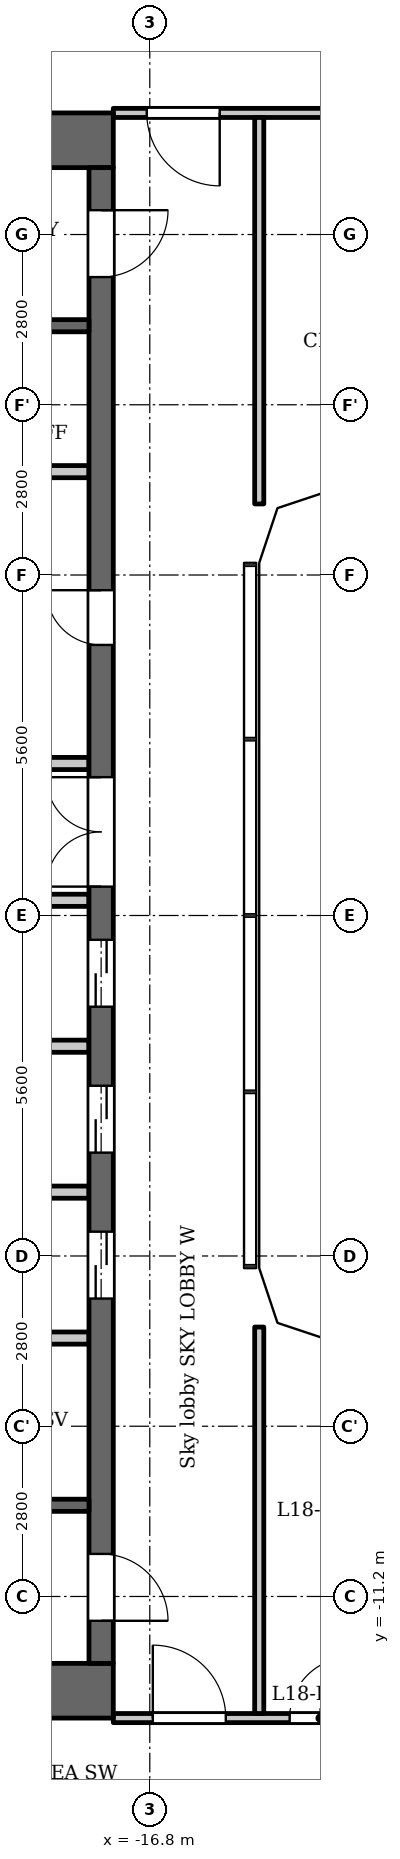
"""IFC4 building model, lengths in metres.
Left out: names, types, materials, properties, quantities, classifications, styles, units other than length and angle.
Written with IfcOpenShell. Run it as: python <this file> out.ifc"""

import sys

from ifc_helpers import new_model, si_unit, direction, frame, frame_2d, origin, place, context, subcontext, project, spatial, polyline, rectangle, outline, extrude, element, fill, save


model = new_model("IFC4")
c1 = context("Model", 3, precision=1e-05, world=origin(), true_north=direction((0.0, 1.0)))
c2 = subcontext(c1, "Body", "Model", "MODEL_VIEW")
j1 = project(units=[si_unit("LENGTHUNIT", "METRE"), si_unit("PLANEANGLEUNIT", "RADIAN")], contexts=[c1])
p1 = place(None, origin())
s1 = spatial("IfcSite", under=j1, at=p1, CompositionType="ELEMENT")
p2 = place(p1, origin())
s2 = spatial("IfcBuilding", under=s1, at=p2, CompositionType="ELEMENT")
p3 = place(p2, frame((0.0, 0.0, 72.5)))
s3 = spatial("IfcBuildingStorey", under=s2, at=p3, CompositionType="ELEMENT", Elevation=72.5)
for number, where, z_axis, x_axis in (
    (1, (-17.4, 12.75, 0.0), (0.0, 0.0, 1.0), (-1.0, 0.0, 0.0)),
    (2, (-17.4, -12.75, 0.0), (0.0, 0.0, 1.0), (-1.0, 0.0, 0.0)),
):
    element("IfcWall", number, at=place(p3, frame(where, z_axis=z_axis, x_axis=x_axis)), inside=s3, PredefinedType="SHEAR", context=c2, shape_type="SweptSolid", body=[
        extrude(rectangle(XDim=10.4, YDim=0.9, at=frame_2d((5.2, 0.0))), origin(), (0.0, 0.0, 1.0), 4.95),
    ])
p4 = place(p3, frame((-17.6, -12.3, 0.0), z_axis=(0.0, 0.0, 1.0), x_axis=(0.0, 1.0, 0.0)))
e3 = element("IfcWall", 3, at=p4, inside=s3, PredefinedType="SHEAR", context=c2, shape_type="SweptSolid", body=[
    extrude(rectangle(XDim=24.6, YDim=0.4, at=frame_2d((12.3, 0.0))), origin(), (0.0, 0.0, 1.0), 4.95),
])
p5 = place(p4, frame((6.0, 0.0, 0.0)))
e4 = element("IfcOpeningElement", 4, at=p5, cuts=e3, PredefinedType="OPENING", context=c2, shape_type="SweptSolid", body=[
    extrude(rectangle(XDim=1.1, YDim=2.1, at=frame_2d((0.55, 1.05))), frame((0.0, 0.21, 0.0), z_axis=(0.0, -1.0, 0.0), x_axis=(1.0, 0.0, 0.0)), (0.0, 0.0, 1.0), 0.42),
])
p6 = place(p4, frame((8.4, 0.0, 0.0)))
e5 = element("IfcOpeningElement", 5, at=p6, cuts=e3, PredefinedType="OPENING", context=c2, shape_type="SweptSolid", body=[
    extrude(rectangle(XDim=1.1, YDim=2.1, at=frame_2d((0.55, 1.05))), frame((0.0, 0.21, 0.0), z_axis=(0.0, -1.0, 0.0), x_axis=(1.0, 0.0, 0.0)), (0.0, 0.0, 1.0), 0.42),
])
p7 = place(p4, frame((10.8, 0.0, 0.0)))
e6 = element("IfcOpeningElement", 6, at=p7, cuts=e3, PredefinedType="OPENING", context=c2, shape_type="SweptSolid", body=[
    extrude(rectangle(XDim=1.1, YDim=2.1, at=frame_2d((0.55, 1.05))), frame((0.0, 0.21, 0.0), z_axis=(0.0, -1.0, 0.0), x_axis=(1.0, 0.0, 0.0)), (0.0, 0.0, 1.0), 0.42),
])
p8 = place(p4, frame((16.75, 0.0, 0.0)))
e7 = element("IfcOpeningElement", 7, at=p8, cuts=e3, PredefinedType="OPENING", context=c2, shape_type="SweptSolid", body=[
    extrude(rectangle(XDim=0.9, YDim=2.1, at=frame_2d((0.45, 1.05))), frame((0.0, 0.21, 0.0), z_axis=(0.0, -1.0, 0.0), x_axis=(1.0, 0.0, 0.0)), (0.0, 0.0, 1.0), 0.42),
])
p9 = place(p4, frame((22.8, 0.0, 0.0)))
e8 = element("IfcOpeningElement", 8, at=p9, cuts=e3, PredefinedType="OPENING", context=c2, shape_type="SweptSolid", body=[
    extrude(rectangle(XDim=1.1, YDim=2.1, at=frame_2d((0.55, 1.05))), frame((0.0, 0.21, 0.0), z_axis=(0.0, -1.0, 0.0), x_axis=(1.0, 0.0, 0.0)), (0.0, 0.0, 1.0), 0.42),
])
p10 = place(p4, frame((0.7, 0.0, 0.0)))
e9 = element("IfcOpeningElement", 9, at=p10, cuts=e3, PredefinedType="OPENING", context=c2, shape_type="SweptSolid", body=[
    extrude(rectangle(XDim=1.1, YDim=2.1, at=frame_2d((0.55, 1.05))), frame((0.0, 0.21, 0.0), z_axis=(0.0, -1.0, 0.0), x_axis=(1.0, 0.0, 0.0)), (0.0, 0.0, 1.0), 0.42),
])
p11 = place(p4, frame((12.775, 0.0, 0.0)))
e10 = element("IfcOpeningElement", 10, at=p11, cuts=e3, PredefinedType="OPENING", context=c2, shape_type="SweptSolid", body=[
    extrude(rectangle(XDim=1.8, YDim=2.1, at=frame_2d((0.9, 1.05))), frame((0.0, 0.21, 0.0), z_axis=(0.0, -1.0, 0.0), x_axis=(1.0, 0.0, 0.0)), (0.0, 0.0, 1.0), 0.42),
])
p12 = place(p3, frame((-17.8, -9.7, 0.0), z_axis=(0.0, 0.0, 1.0), x_axis=(-1.0, 0.0, 0.0)))
e11 = element("IfcWall", 11, at=p12, inside=s3, PredefinedType="SHEAR", context=c2, shape_type="SweptSolid", body=[
    extrude(rectangle(XDim=8.3, YDim=0.2, at=frame_2d((4.15, 0.0))), origin(), (0.0, 0.0, 1.0), 4.95),
])
p13 = place(p12, frame((0.85, 0.0, 0.0)))
e12 = element("IfcOpeningElement", 12, at=p13, cuts=e11, PredefinedType="OPENING", context=c2, shape_type="SweptSolid", body=[
    extrude(rectangle(XDim=1.1, YDim=2.1, at=frame_2d((0.55, 1.05))), frame((0.0, 0.11, 0.0), z_axis=(0.0, -1.0, 0.0), x_axis=(1.0, 0.0, 0.0)), (0.0, 0.0, 1.0), 0.22),
])
p14 = place(p12, frame((3.75, 0.0, 0.0)))
e13 = element("IfcOpeningElement", 13, at=p14, cuts=e11, PredefinedType="OPENING", context=c2, shape_type="SweptSolid", body=[
    extrude(rectangle(XDim=1.1, YDim=2.1, at=frame_2d((0.55, 1.05))), frame((0.0, 0.11, 0.0), z_axis=(0.0, -1.0, 0.0), x_axis=(1.0, 0.0, 0.0)), (0.0, 0.0, 1.0), 0.22),
])
for number, where, z_axis, x_axis in (
    (14, (-17.8, -6.95, 0.0), (0.0, 0.0, 1.0), (-1.0, 0.0, 0.0)),
    (15, (-17.8, -4.55, 0.0), (0.0, 0.0, 1.0), (-1.0, 0.0, 0.0)),
    (16, (-17.8, -2.15, 0.0), (0.0, 0.0, 1.0), (-1.0, 0.0, 0.0)),
):
    element("IfcWall", number, at=place(p3, frame(where, z_axis=z_axis, x_axis=x_axis)), inside=s3, PredefinedType="PARTITIONING", context=c2, shape_type="SweptSolid", body=[
        extrude(rectangle(XDim=2.8, YDim=0.2, at=frame_2d((1.4, 0.0))), origin(), (0.0, 0.0, 1.0), 4.95),
    ])
for number, where, z_axis, x_axis in (
    (17, (-17.8, 0.25, 0.0), (0.0, 0.0, 1.0), (-1.0, 0.0, 0.0)),
    (18, (-17.8, 2.5, 0.0), (0.0, 0.0, 1.0), (-1.0, 0.0, 0.0)),
):
    element("IfcWall", number, at=place(p3, frame(where, z_axis=z_axis, x_axis=x_axis)), inside=s3, PredefinedType="PARTITIONING", context=c2, shape_type="SweptSolid", body=[
        extrude(rectangle(XDim=3.0, YDim=0.2, at=frame_2d((1.5, 0.0))), origin(), (0.0, 0.0, 1.0), 4.95),
    ])
p15 = place(p3, frame((-17.8, 7.3, 0.0), z_axis=(0.0, 0.0, 1.0), x_axis=(-1.0, 0.0, 0.0)))
e19 = element("IfcWall", 19, at=p15, inside=s3, PredefinedType="PARTITIONING", context=c2, shape_type="SweptSolid", body=[
    extrude(rectangle(XDim=2.8, YDim=0.2, at=frame_2d((1.4, 0.0))), origin(), (0.0, 0.0, 1.0), 4.95),
])
p16 = place(p3, frame((-17.8, 9.7, 0.0), z_axis=(0.0, 0.0, 1.0), x_axis=(-1.0, 0.0, 0.0)))
e20 = element("IfcWall", 20, at=p16, inside=s3, PredefinedType="SHEAR", context=c2, shape_type="SweptSolid", body=[
    extrude(rectangle(XDim=8.3, YDim=0.2, at=frame_2d((4.15, 0.0))), origin(), (0.0, 0.0, 1.0), 4.95),
])
p17 = place(p16, frame((0.85, 0.0, 0.0)))
e21 = element("IfcOpeningElement", 21, at=p17, cuts=e20, PredefinedType="OPENING", context=c2, shape_type="SweptSolid", body=[
    extrude(rectangle(XDim=1.1, YDim=2.1, at=frame_2d((0.55, 1.05))), frame((0.0, 0.11, 0.0), z_axis=(0.0, -1.0, 0.0), x_axis=(1.0, 0.0, 0.0)), (0.0, 0.0, 1.0), 0.22),
])
p18 = place(p16, frame((3.75, 0.0, 0.0)))
e22 = element("IfcOpeningElement", 22, at=p18, cuts=e20, PredefinedType="OPENING", context=c2, shape_type="SweptSolid", body=[
    extrude(rectangle(XDim=1.1, YDim=2.1, at=frame_2d((0.55, 1.05))), frame((0.0, 0.11, 0.0), z_axis=(0.0, -1.0, 0.0), x_axis=(1.0, 0.0, 0.0)), (0.0, 0.0, 1.0), 0.22),
])
p19 = place(p3, frame((-17.4, -13.2, 0.0), z_axis=(0.0, 0.0, 1.0), x_axis=(1.0, 0.0, 0.0)))
e23 = element("IfcWall", 23, at=p19, inside=s3, PredefinedType="PARTITIONING", context=c2, shape_type="SweptSolid", body=[
    extrude(rectangle(XDim=6.016, YDim=0.15, at=frame_2d((3.008, 0.0))), origin(), (0.0, 0.0, 1.0), 4.95),
])
p20 = place(p19, frame((0.65, 0.0, 0.0)))
e24 = element("IfcOpeningElement", 24, at=p20, cuts=e23, PredefinedType="OPENING", context=c2, shape_type="SweptSolid", body=[
    extrude(rectangle(XDim=1.2, YDim=2.1, at=frame_2d((0.6, 1.05))), frame((0.0, 0.085, 0.0), z_axis=(0.0, -1.0, 0.0), x_axis=(1.0, 0.0, 0.0)), (0.0, 0.0, 1.0), 0.17),
])
p21 = place(p19, frame((4.71, 0.0, 0.0)))
e25 = element("IfcOpeningElement", 25, at=p21, cuts=e23, PredefinedType="OPENING", context=c2, shape_type="SweptSolid", body=[
    extrude(rectangle(XDim=1.0, YDim=2.1, at=frame_2d((0.5, 1.05))), frame((0.0, 0.085, 0.0), z_axis=(0.0, -1.0, 0.0), x_axis=(1.0, 0.0, 0.0)), (0.0, 0.0, 1.0), 0.17),
])
p22 = place(p19, frame((2.9, 0.0, 0.0)))
e26 = element("IfcOpeningElement", 26, at=p22, cuts=e23, PredefinedType="OPENING", context=c2, shape_type="SweptSolid", body=[
    extrude(rectangle(XDim=1.0, YDim=2.1, at=frame_2d((0.5, 1.05))), frame((0.0, 0.085, 0.0), z_axis=(0.0, -1.0, 0.0), x_axis=(1.0, 0.0, 0.0)), (0.0, 0.0, 1.0), 0.17),
])
p23 = place(p3, frame((-17.4, 13.2, 0.0), z_axis=(0.0, 0.0, 1.0), x_axis=(1.0, 0.0, 0.0)))
e27 = element("IfcWall", 27, at=p23, inside=s3, PredefinedType="PARTITIONING", context=c2, shape_type="SweptSolid", body=[
    extrude(rectangle(XDim=6.016, YDim=0.15, at=frame_2d((3.008, 0.0))), origin(), (0.0, 0.0, 1.0), 4.95),
])
p24 = place(p23, frame((0.55, 0.0, 0.0)))
e28 = element("IfcOpeningElement", 28, at=p24, cuts=e27, PredefinedType="OPENING", context=c2, shape_type="SweptSolid", body=[
    extrude(rectangle(XDim=1.2, YDim=2.1, at=frame_2d((0.6, 1.05))), frame((0.0, 0.085, 0.0), z_axis=(0.0, -1.0, 0.0), x_axis=(1.0, 0.0, 0.0)), (0.0, 0.0, 1.0), 0.17),
])
p25 = place(p23, frame((4.55, 0.0, 0.0)))
e29 = element("IfcOpeningElement", 29, at=p25, cuts=e27, PredefinedType="OPENING", context=c2, shape_type="SweptSolid", body=[
    extrude(rectangle(XDim=0.9, YDim=2.1, at=frame_2d((0.45, 1.05))), frame((0.0, 0.085, 0.0), z_axis=(0.0, -1.0, 0.0), x_axis=(1.0, 0.0, 0.0)), (0.0, 0.0, 1.0), 0.17),
])
for number, where, z_axis, x_axis in (
    (30, (-15.0, -13.125, 0.0), (0.0, 0.0, 1.0), (0.0, 1.0, 0.0)),
    (31, (-15.0, 6.769, 0.0), (0.0, 0.0, 1.0), (0.0, 1.0, 0.0)),
):
    element("IfcWall", number, at=place(p3, frame(where, z_axis=z_axis, x_axis=x_axis)), inside=s3, PredefinedType="PARTITIONING", context=c2, shape_type="SweptSolid", body=[
        extrude(rectangle(XDim=6.356, YDim=0.15, at=frame_2d((3.178, 0.0))), origin(), (0.0, 0.0, 1.0), 4.95),
    ])
p26 = place(p3, origin())
e32 = element("IfcWall", 32, at=p26, inside=s3, PredefinedType="SOLIDWALL", context=c2, shape_type="SweptSolid", body=[
    extrude(outline(polyline([(-15.0, 5.8), (-14.7, 6.7), (-13.8, 7.0), (-13.8, 7.3), (-13.849, 7.3), (-14.937, 6.937), (-15.3, 5.849), (-15.3, 5.8), (-15.0, 5.8)])), origin(), (0.0, 0.0, 1.0), 4.95),
])
e33 = element("IfcWall", 33, at=p26, inside=s3, PredefinedType="SOLIDWALL", context=c2, shape_type="SweptSolid", body=[
    extrude(outline(polyline([(-13.8, -7.0), (-14.7, -6.7), (-15.0, -5.8), (-15.3, -5.8), (-15.3, -5.849), (-14.937, -6.937), (-13.849, -7.3), (-13.8, -7.3), (-13.8, -7.0)])), origin(), (0.0, 0.0, 1.0), 4.95),
])
p27 = place(p5, origin())
e34 = element("IfcDoor", 34, at=p27, inside=s3, OperationType="DOUBLE_DOOR_SLIDING", PredefinedType="DOOR", context=c2, shape_type="SweptSolid", body=[
    extrude(rectangle(XDim=1.1, YDim=2.1, at=frame_2d((0.55, 1.05))), frame((0.0, 0.025, 0.0), z_axis=(0.0, -1.0, 0.0), x_axis=(1.0, 0.0, 0.0)), (0.0, 0.0, 1.0), 0.05),
])
fill(e4, e34)
p28 = place(p6, origin())
e35 = element("IfcDoor", 35, at=p28, inside=s3, OperationType="DOUBLE_DOOR_SLIDING", PredefinedType="DOOR", context=c2, shape_type="SweptSolid", body=[
    extrude(rectangle(XDim=1.1, YDim=2.1, at=frame_2d((0.55, 1.05))), frame((0.0, 0.025, 0.0), z_axis=(0.0, -1.0, 0.0), x_axis=(1.0, 0.0, 0.0)), (0.0, 0.0, 1.0), 0.05),
])
fill(e5, e35)
p29 = place(p7, origin())
e36 = element("IfcDoor", 36, at=p29, inside=s3, OperationType="DOUBLE_DOOR_SLIDING", PredefinedType="DOOR", context=c2, shape_type="SweptSolid", body=[
    extrude(rectangle(XDim=1.1, YDim=2.1, at=frame_2d((0.55, 1.05))), frame((0.0, 0.025, 0.0), z_axis=(0.0, -1.0, 0.0), x_axis=(1.0, 0.0, 0.0)), (0.0, 0.0, 1.0), 0.05),
])
fill(e6, e36)
p30 = place(p8, origin())
e37 = element("IfcDoor", 37, at=p30, inside=s3, OperationType="SINGLE_SWING_LEFT", PredefinedType="DOOR", context=c2, shape_type="SweptSolid", body=[
    extrude(rectangle(XDim=0.9, YDim=2.1, at=frame_2d((0.45, 1.05))), frame((0.0, 0.025, 0.0), z_axis=(0.0, -1.0, 0.0), x_axis=(1.0, 0.0, 0.0)), (0.0, 0.0, 1.0), 0.05),
])
fill(e7, e37)
p31 = place(p9, origin())
e38 = element("IfcDoor", 38, at=p31, inside=s3, OperationType="SINGLE_SWING_RIGHT", PredefinedType="DOOR", context=c2, shape_type="SweptSolid", body=[
    extrude(rectangle(XDim=1.1, YDim=2.1, at=frame_2d((0.55, 1.05))), frame((0.0, 0.025, 0.0), z_axis=(0.0, -1.0, 0.0), x_axis=(1.0, 0.0, 0.0)), (0.0, 0.0, 1.0), 0.05),
])
fill(e8, e38)
p32 = place(p10, origin())
e39 = element("IfcDoor", 39, at=p32, inside=s3, OperationType="SINGLE_SWING_LEFT", PredefinedType="DOOR", context=c2, shape_type="SweptSolid", body=[
    extrude(rectangle(XDim=1.1, YDim=2.1, at=frame_2d((0.55, 1.05))), frame((0.0, 0.025, 0.0), z_axis=(0.0, -1.0, 0.0), x_axis=(1.0, 0.0, 0.0)), (0.0, 0.0, 1.0), 0.05),
])
fill(e9, e39)
p33 = place(p11, origin())
e40 = element("IfcDoor", 40, at=p33, inside=s3, OperationType="DOUBLE_DOOR_SINGLE_SWING", PredefinedType="DOOR", context=c2, shape_type="SweptSolid", body=[
    extrude(rectangle(XDim=1.8, YDim=2.1, at=frame_2d((0.9, 1.05))), frame((0.0, 0.025, 0.0), z_axis=(0.0, -1.0, 0.0), x_axis=(1.0, 0.0, 0.0)), (0.0, 0.0, 1.0), 0.05),
])
fill(e10, e40)
p34 = place(p24, origin())
e41 = element("IfcDoor", 41, at=p34, inside=s3, OperationType="SINGLE_SWING_RIGHT", PredefinedType="DOOR", context=c2, shape_type="SweptSolid", body=[
    extrude(rectangle(XDim=1.2, YDim=2.1, at=frame_2d((0.6, 1.05))), frame((0.0, 0.025, 0.0), z_axis=(0.0, -1.0, 0.0), x_axis=(1.0, 0.0, 0.0)), (0.0, 0.0, 1.0), 0.05),
])
fill(e28, e41)
p35 = place(p20, origin())
e42 = element("IfcDoor", 42, at=p35, inside=s3, OperationType="SINGLE_SWING_RIGHT", PredefinedType="DOOR", context=c2, shape_type="SweptSolid", body=[
    extrude(rectangle(XDim=1.2, YDim=2.1, at=frame_2d((0.6, 1.05))), frame((0.0, 0.025, 0.0), z_axis=(0.0, -1.0, 0.0), x_axis=(1.0, 0.0, 0.0)), (0.0, 0.0, 1.0), 0.05),
])
fill(e24, e42)
p36 = place(p22, origin())
e43 = element("IfcDoor", 43, at=p36, inside=s3, OperationType="SINGLE_SWING_LEFT", PredefinedType="DOOR", context=c2, shape_type="SweptSolid", body=[
    extrude(rectangle(XDim=1.0, YDim=2.1, at=frame_2d((0.5, 1.05))), frame((0.0, 0.025, 0.0), z_axis=(0.0, -1.0, 0.0), x_axis=(1.0, 0.0, 0.0)), (0.0, 0.0, 1.0), 0.05),
])
fill(e26, e43)
save(model, sys.argv[1])
